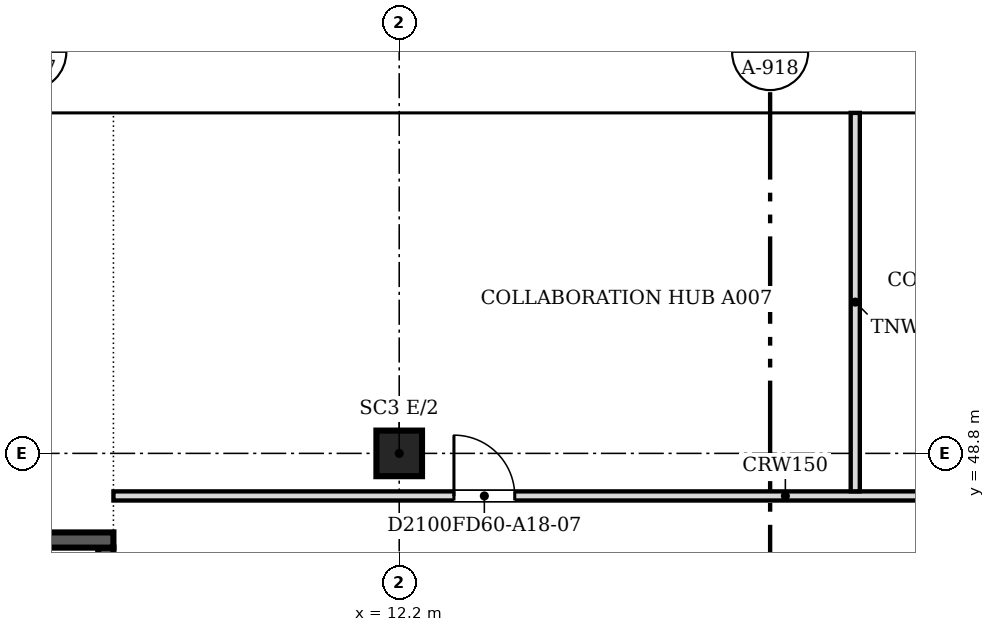
"""IFC4 building model, lengths in metres.
Left out: names, types, materials, properties, quantities, classifications, styles, units other than length and angle.
Written with IfcOpenShell. Run it as: python <this file> out.ifc"""

import sys

from ifc_helpers import new_model, si_unit, direction, frame, frame_2d, origin, origin_2d, place, context, subcontext, project, spatial, polyline, rectangle, outline, extrude, faceted_brep, source, transform, mapped, element, fill, save


model = new_model("IFC4")
c1 = context("Model", 3, precision=1e-05, world=origin(), true_north=direction((0.0, 1.0)))
c2 = subcontext(c1, "Body", "Model", "MODEL_VIEW")
j1 = project(units=[si_unit("LENGTHUNIT", "METRE"), si_unit("PLANEANGLEUNIT", "RADIAN")], contexts=[c1])
p1 = place(None, origin())
s1 = spatial("IfcSite", under=j1, at=p1, CompositionType="ELEMENT")
p2 = place(p1, origin())
s2 = spatial("IfcBuilding", under=s1, at=p2, CompositionType="ELEMENT")
p3 = place(p2, frame((0.0, 0.0, 197.9)))
s3 = spatial("IfcBuildingStorey", under=s2, at=p3, CompositionType="ELEMENT", Elevation=197.9)
p4 = place(p3, frame((12.2, 48.8, 0.0), z_axis=(0.0, 0.0, 1.0), x_axis=(1.0, 0.0, 0.0)))
e1 = element("IfcColumn", 1, at=p4, inside=s3, PredefinedType="COLUMN", context=c2, shape_type="SweptSolid", body=[
    extrude(rectangle(XDim=0.75, YDim=0.75, at=origin_2d()), origin(), (0.0, 0.0, 1.0), 3.6),
])
m1 = source(origin(), c2, "Body", "SweptSolid", [
    extrude(outline(polyline([(6.1, 0.0), (3.05, 3.8), (0.0, 0.0), (6.1, 0.0)])), frame((0.0, 0.25, 0.0), z_axis=(0.0, -1.0, 0.0), x_axis=(1.0, 0.0, 0.0)), (0.0, 0.0, 1.0), 0.5),
])
p5 = place(p3, frame((21.35, 54.65, 0.0), z_axis=(0.0, 0.0, 1.0), x_axis=(-1.0, 0.0, 0.0)))
e2 = element("IfcWall", 2, at=p5, inside=s3, PredefinedType="SOLIDWALL", context=c2, shape_type="MappedRepresentation", body=[
    mapped(m1, transform((0.0, 0.0, 0.0), scale=1.0)),
])
m2 = source(origin(), c2, "Body", "SweptSolid", [
    extrude(outline(polyline([(5.579, 0.25), (3.05, 3.401), (0.521, 0.25), (5.579, 0.25)])), frame((0.0, 0.26, 0.0), z_axis=(0.0, -1.0, 0.0), x_axis=(1.0, 0.0, 0.0)), (0.0, 0.0, 1.0), 0.52),
])
p6 = place(p5, origin())
e3 = element("IfcOpeningElement", 3, at=p6, cuts=e2, PredefinedType="OPENING", context=c2, shape_type="MappedRepresentation", body=[
    mapped(m2, transform((0.0, 0.0, 0.0), scale=1.0)),
])
p7 = place(p3, frame((15.25, 54.65, 0.0), z_axis=(0.0, 0.0, 1.0), x_axis=(-1.0, 0.0, 0.0)))
e4 = element("IfcWall", 4, at=p7, inside=s3, PredefinedType="SOLIDWALL", context=c2, shape_type="MappedRepresentation", body=[
    mapped(m1, transform((0.0, 0.0, 0.0), scale=1.0)),
])
p8 = place(p7, origin())
e5 = element("IfcOpeningElement", 5, at=p8, cuts=e4, PredefinedType="OPENING", context=c2, shape_type="MappedRepresentation", body=[
    mapped(m2, transform((0.0, 0.0, 0.0), scale=1.0)),
])
m3 = source(origin(), c2, "Body", "Brep", [
    faceted_brep([(3.05, -0.25, 3.74), (3.003, -0.25, 3.8), (0.0, -0.25, 0.0), (3.05, -0.25, 0.0), (0.0, 0.25, 0.0), (2.957, 0.25, 3.741), (2.957, 0.25, 0.0), (3.003, 0.0, 3.8)], [[[0, 1, 2, 3]], [[4, 5, 6]], [[7, 1, 0]], [[5, 4, 2, 1, 7]], [[4, 6, 3, 2]], [[3, 6, 5, 7, 0]]]),
])
p9 = place(p3, frame((9.15, 54.65, 0.0), z_axis=(0.0, 0.0, 1.0), x_axis=(-1.0, 0.0, 0.0)))
e6 = element("IfcWall", 6, at=p9, inside=s3, PredefinedType="SOLIDWALL", context=c2, shape_type="MappedRepresentation", body=[
    mapped(m3, transform((0.0, 0.0, 0.0), scale=1.0)),
])
m4 = source(origin(), c2, "Body", "SweptSolid", [
    extrude(outline(polyline([(2.803, 3.144), (0.516, 0.25), (2.803, 0.25), (2.803, 3.144)])), frame((0.0, 0.26, 0.0), z_axis=(0.0, -1.0, 0.0), x_axis=(1.0, 0.0, 0.0)), (0.0, 0.0, 1.0), 0.52),
])
p10 = place(p9, origin())
e7 = element("IfcOpeningElement", 7, at=p10, cuts=e6, PredefinedType="OPENING", context=c2, shape_type="MappedRepresentation", body=[
    mapped(m4, transform((0.0, 0.0, 0.0), scale=1.0)),
])
p11 = place(p2, frame((0.0, 0.0, 201.7)))
s4 = spatial("IfcBuildingStorey", under=s2, at=p11, CompositionType="ELEMENT", Elevation=201.7)
m5 = source(origin(), c2, "Body", "Brep", [
    faceted_brep([(3.05, -0.25, 0.0), (6.1, -0.25, 3.8), (6.1, -0.25, 3.8), (3.05, -0.25, 7.6), (0.0, -0.25, 3.8), (0.0, 0.25, 3.8), (3.05, 0.25, 7.6), (6.1, 0.25, 3.8), (6.1, 0.25, 3.8), (3.05, 0.25, 0.0)], [[[0, 1, 2, 3, 4]], [[5, 6, 7, 8, 9]], [[9, 8, 1, 0]], [[7, 6, 3, 2]], [[6, 5, 4, 3]], [[5, 9, 0, 4]], [[1, 8, 7, 2]]]),
])
p12 = place(p11, frame((24.4, 54.65, -3.8), z_axis=(0.0, 0.0, 1.0), x_axis=(-1.0, 0.0, 0.0)))
e8 = element("IfcWall", 8, at=p12, inside=s4, PredefinedType="SOLIDWALL", context=c2, shape_type="MappedRepresentation", body=[
    mapped(m5, transform((0.0, 0.0, 0.0), scale=1.0)),
])
m6 = source(origin(), c2, "Body", "SweptSolid", [
    extrude(outline(polyline([(3.05, 0.399), (5.78, 3.8), (3.05, 7.201), (0.321, 3.8), (3.05, 0.399)])), frame((0.0, 0.26, 0.0), z_axis=(0.0, -1.0, 0.0), x_axis=(1.0, 0.0, 0.0)), (0.0, 0.0, 1.0), 0.52),
])
p13 = place(p12, origin())
e9 = element("IfcOpeningElement", 9, at=p13, cuts=e8, PredefinedType="OPENING", context=c2, shape_type="MappedRepresentation", body=[
    mapped(m6, transform((0.0, 0.0, 0.0), scale=1.0)),
])
m7 = source(origin(), c2, "Body", "SweptSolid", [
    extrude(outline(polyline([(3.05, 0.0), (6.1, 3.8), (3.05, 7.6), (0.0, 3.8), (3.05, 0.0)])), frame((0.0, 0.25, 0.0), z_axis=(0.0, -1.0, 0.0), x_axis=(1.0, 0.0, 0.0)), (0.0, 0.0, 1.0), 0.5),
])
p14 = place(p11, frame((18.3, 54.65, -3.8), z_axis=(0.0, 0.0, 1.0), x_axis=(-1.0, 0.0, 0.0)))
e10 = element("IfcWall", 10, at=p14, inside=s4, PredefinedType="SOLIDWALL", context=c2, shape_type="MappedRepresentation", body=[
    mapped(m7, transform((0.0, 0.0, 0.0), scale=1.0)),
])
p15 = place(p14, origin())
e11 = element("IfcOpeningElement", 11, at=p15, cuts=e10, PredefinedType="OPENING", context=c2, shape_type="MappedRepresentation", body=[
    mapped(m6, transform((0.0, 0.0, 0.0), scale=1.0)),
])
m8 = source(origin(), c2, "Body", "Brep", [
    faceted_brep([(3.05, -0.25, 0.0), (6.053, -0.25, 3.8), (3.05, -0.25, 7.6), (0.0, -0.25, 3.8), (0.0, 0.25, 3.8), (3.05, 0.25, 7.6), (6.007, 0.25, 3.859), (6.007, 0.25, 3.741), (3.05, 0.25, 0.0), (6.053, 0.0, 3.8)], [[[0, 1, 2, 3]], [[4, 5, 6, 7, 8]], [[8, 7, 9, 1, 0]], [[6, 5, 2, 1, 9]], [[5, 4, 3, 2]], [[4, 8, 0, 3]], [[9, 7, 6]]]),
])
p16 = place(p11, frame((12.2, 54.65, -3.8), z_axis=(0.0, 0.0, 1.0), x_axis=(-1.0, 0.0, 0.0)))
e12 = element("IfcWall", 12, at=p16, inside=s4, PredefinedType="SOLIDWALL", context=c2, shape_type="MappedRepresentation", body=[
    mapped(m8, transform((0.0, 0.0, 0.0), scale=1.0)),
])
m9 = source(origin(), c2, "Body", "SweptSolid", [
    extrude(outline(polyline([(3.049, 0.401), (5.735, 3.8), (3.049, 7.199), (0.321, 3.8), (3.049, 0.401)])), frame((0.0, 0.26, 0.0), z_axis=(0.0, -1.0, 0.0), x_axis=(1.0, 0.0, 0.0)), (0.0, 0.0, 1.0), 0.52),
])
p17 = place(p16, origin())
e13 = element("IfcOpeningElement", 13, at=p17, cuts=e12, PredefinedType="OPENING", context=c2, shape_type="MappedRepresentation", body=[
    mapped(m9, transform((0.0, 0.0, 0.0), scale=1.0)),
])
p18 = place(p3, frame((3.6, 47.375, 0.0), z_axis=(0.0, 0.0, 1.0), x_axis=(1.0, 0.0, 0.0)))
e14 = element("IfcWall", 14, at=p18, inside=s3, PredefinedType="SOLIDWALL", context=c2, shape_type="SweptSolid", body=[
    extrude(rectangle(XDim=3.9, YDim=0.25, at=frame_2d((1.95, 0.0))), origin(), (0.0, 0.0, 1.0), 3.8),
])
p19 = place(p3, frame((7.375, 47.25, 0.0), z_axis=(0.0, 0.0, 1.0), x_axis=(0.0, -1.0, 0.0)))
e15 = element("IfcWall", 15, at=p19, inside=s3, PredefinedType="SOLIDWALL", context=c2, shape_type="SweptSolid", body=[
    extrude(rectangle(XDim=8.0, YDim=0.25, at=frame_2d((4.0, 0.0))), origin(), (0.0, 0.0, 1.0), 3.8),
])
m10 = source(origin(), c2, "Body", "SweptSolid", [
    extrude(rectangle(XDim=1.2, YDim=2.1, at=frame_2d((0.6, 1.05))), frame((0.0, 0.135, 0.0), z_axis=(0.0, -1.0, 0.0), x_axis=(1.0, 0.0, 0.0)), (0.0, 0.0, 1.0), 0.27),
])
p20 = place(p19, frame((0.15, 0.0, 0.0)))
e16 = element("IfcOpeningElement", 16, at=p20, cuts=e15, PredefinedType="OPENING", context=c2, shape_type="MappedRepresentation", body=[
    mapped(m10, transform((0.0, 0.0, 0.0), scale=1.0)),
])
p21 = place(p3, frame((7.5, 48.1, 0.0), z_axis=(0.0, 0.0, 1.0), x_axis=(1.0, 0.0, 0.0)))
e17 = element("IfcWall", 17, at=p21, inside=s3, PredefinedType="PARTITIONING", context=c2, shape_type="SweptSolid", body=[
    extrude(rectangle(XDim=20.9, YDim=0.15, at=frame_2d((10.45, 0.0))), origin(), (0.0, 0.0, 1.0), 3.067),
])
m11 = source(origin(), c2, "Body", "SweptSolid", [
    extrude(rectangle(XDim=1.0, YDim=2.1, at=frame_2d((0.5, 1.05))), frame((0.0, 0.085, 0.0), z_axis=(0.0, -1.0, 0.0), x_axis=(1.0, 0.0, 0.0)), (0.0, 0.0, 1.0), 0.17),
])
p22 = place(p21, frame((15.501, 0.0, 0.0)))
e18 = element("IfcOpeningElement", 18, at=p22, cuts=e17, PredefinedType="OPENING", context=c2, shape_type="MappedRepresentation", body=[
    mapped(m11, transform((0.0, 0.0, 0.0), scale=1.0)),
])
p23 = place(p21, frame((5.6, 0.0, 0.0)))
e19 = element("IfcOpeningElement", 19, at=p23, cuts=e17, PredefinedType="OPENING", context=c2, shape_type="MappedRepresentation", body=[
    mapped(m11, transform((0.0, 0.0, 0.0), scale=1.0)),
])
p24 = place(p3, frame((19.7, 48.176, 0.0), z_axis=(0.0, 0.0, 1.0), x_axis=(0.0, 1.0, 0.0)))
e20 = element("IfcWall", 20, at=p24, inside=s3, PredefinedType="PARTITIONING", context=c2, shape_type="SweptSolid", body=[
    extrude(rectangle(XDim=6.224, YDim=0.15, at=frame_2d((3.112, 0.0))), origin(), (0.0, 0.0, 1.0), 3.067),
])
m12 = source(origin(), c2, "Body", "SweptSolid", [
    extrude(rectangle(XDim=1.0, YDim=2.1, at=frame_2d((0.5, 1.05))), frame((0.0, 0.025, 0.0), z_axis=(0.0, -1.0, 0.0), x_axis=(1.0, 0.0, 0.0)), (0.0, 0.0, 1.0), 0.05),
])
p25 = place(p23, origin())
e21 = element("IfcDoor", 21, at=p25, inside=s3, OperationType="SINGLE_SWING_LEFT", PredefinedType="DOOR", context=c2, shape_type="MappedRepresentation", body=[
    mapped(m12, transform((0.0, 0.0, 0.0), scale=1.0)),
])
fill(e19, e21)
save(model, sys.argv[1])
